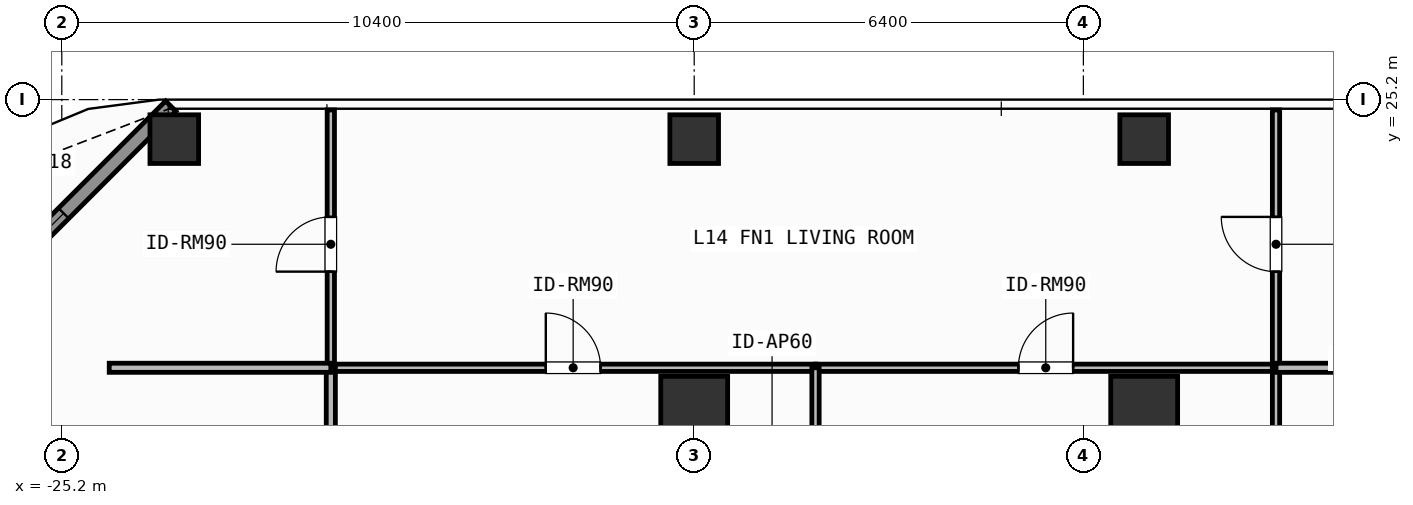
"""IFC4 building model, lengths in metres.
Left out: names, types, materials, properties, quantities, classifications, styles, units other than length and angle.
Written with IfcOpenShell. Run it as: python <this file> out.ifc"""

import sys

from ifc_helpers import new_model, si_unit, direction, frame, frame_2d, origin, origin_2d, place, context, subcontext, project, spatial, rectangle, hollow_rectangle, extrude, element, fill, save


model = new_model("IFC4")
c1 = context("Model", 3, precision=1e-05, world=origin(), true_north=direction((0.0, 1.0)))
c2 = subcontext(c1, "Body", "Model", "MODEL_VIEW")
j1 = project(units=[si_unit("LENGTHUNIT", "METRE"), si_unit("PLANEANGLEUNIT", "RADIAN")], contexts=[c1])
p1 = place(None, origin())
s1 = spatial("IfcSite", under=j1, at=p1, CompositionType="ELEMENT")
p2 = place(p1, origin())
s2 = spatial("IfcBuilding", under=s1, at=p2, CompositionType="ELEMENT")
p3 = place(p2, frame((0.0, 0.0, 54.0)))
s3 = spatial("IfcBuildingStorey", under=s2, at=p3, CompositionType="ELEMENT", Elevation=54.0)
for number, where, z_axis, x_axis in (
    (1, (-14.8, 20.1, 0.0), (0.0, 0.0, 1.0), (1.0, 0.0, 0.0)),
    (2, (-7.4, 20.1, 0.0), (0.0, 0.0, 1.0), (1.0, 0.0, 0.0)),
):
    element("IfcColumn", number, at=place(p3, frame(where, z_axis=z_axis, x_axis=x_axis)), inside=s3, PredefinedType="COLUMN", context=c2, shape_type="SweptSolid", body=[
        extrude(rectangle(XDim=1.1, YDim=1.1, at=origin_2d()), origin(), (0.0, 0.0, 1.0), 3.9),
    ])
for number, where, z_axis, x_axis in (
    (3, (-23.35, 24.55, 0.0), (0.0, 0.0, 1.0), (1.0, 0.0, 0.0)),
    (4, (-14.8, 24.55, 0.0), (0.0, 0.0, 1.0), (1.0, 0.0, 0.0)),
    (5, (-7.4, 24.55, 0.0), (0.0, 0.0, 1.0), (1.0, 0.0, 0.0)),
):
    element("IfcColumn", number, at=place(p3, frame(where, z_axis=z_axis, x_axis=x_axis)), inside=s3, PredefinedType="COLUMN", context=c2, shape_type="SweptSolid", body=[
        extrude(hollow_rectangle(XDim=0.8, YDim=0.8, WallThickness=0.036, at=origin_2d()), origin(), (0.0, 0.0, 1.0), 3.9),
    ])
p4 = place(p3, frame((-27.992, 20.508, 0.0), z_axis=(0.0, 0.0, 1.0), x_axis=(0.707106781187, 0.707106781187, 0.0)))
e6 = element("IfcWall", 6, at=p4, inside=s3, PredefinedType="SOLIDWALL", context=c2, shape_type="SweptSolid", body=[
    extrude(rectangle(XDim=6.484, YDim=0.24, at=frame_2d((3.242, 0.0))), origin(), (0.0, 0.0, 1.0), 3.68),
])
p5 = place(p4, frame((2.492, 0.0, 0.8)))
e7 = element("IfcOpeningElement", 7, at=p5, cuts=e6, PredefinedType="OPENING", context=c2, shape_type="SweptSolid", body=[
    extrude(rectangle(XDim=1.5, YDim=1.85, at=frame_2d((0.75, 0.925))), frame((0.0, 0.13, 0.0), z_axis=(0.0, -1.0, 0.0), x_axis=(1.0, 0.0, 0.0)), (0.0, 0.0, 1.0), 0.26),
])
p6 = place(p3, frame((-20.776, 20.79, 0.0), z_axis=(0.0, 0.0, 1.0), x_axis=(1.0, 0.0, 0.0)))
e8 = element("IfcWall", 8, at=p6, inside=s3, PredefinedType="PARTITIONING", context=c2, shape_type="SweptSolid", body=[
    extrude(rectangle(XDim=7.971, YDim=0.12, at=frame_2d((3.985, 0.0))), origin(), (0.0, 0.0, 1.0), 3.68),
])
p7 = place(p6, frame((3.535, 0.0, 0.0)))
e9 = element("IfcOpeningElement", 9, at=p7, cuts=e8, PredefinedType="OPENING", context=c2, shape_type="SweptSolid", body=[
    extrude(rectangle(XDim=0.9, YDim=2.1, at=frame_2d((0.45, 1.05))), frame((0.0, 0.07, 0.0), z_axis=(0.0, -1.0, 0.0), x_axis=(1.0, 0.0, 0.0)), (0.0, 0.0, 1.0), 0.14),
])
p8 = place(p3, frame((-12.805, 20.79, 0.0), z_axis=(0.0, 0.0, 1.0), x_axis=(1.0, 0.0, 0.0)))
e10 = element("IfcWall", 10, at=p8, inside=s3, PredefinedType="PARTITIONING", context=c2, shape_type="SweptSolid", body=[
    extrude(rectangle(XDim=7.573, YDim=0.12, at=frame_2d((3.787, 0.0))), origin(), (0.0, 0.0, 1.0), 3.68),
])
p9 = place(p8, frame((3.336, 0.0, 0.0)))
e11 = element("IfcOpeningElement", 11, at=p9, cuts=e10, PredefinedType="OPENING", context=c2, shape_type="SweptSolid", body=[
    extrude(rectangle(XDim=0.9, YDim=2.1, at=frame_2d((0.45, 1.05))), frame((0.0, 0.07, 0.0), z_axis=(0.0, -1.0, 0.0), x_axis=(1.0, 0.0, 0.0)), (0.0, 0.0, 1.0), 0.14),
])
p10 = place(p3, frame((-12.805, 13.7, 0.0), z_axis=(0.0, 0.0, 1.0), x_axis=(0.0, 1.0, 0.0)))
e12 = element("IfcWall", 12, at=p10, inside=s3, PredefinedType="PARTITIONING", context=c2, shape_type="SweptSolid", body=[
    extrude(rectangle(XDim=7.09, YDim=0.12, at=frame_2d((3.545, 0.0))), origin(), (0.0, 0.0, 1.0), 3.68),
])
p11 = place(p10, frame((3.006, 0.0, 0.0)))
e13 = element("IfcOpeningElement", 13, at=p11, cuts=e12, PredefinedType="OPENING", context=c2, shape_type="SweptSolid", body=[
    extrude(rectangle(XDim=0.9, YDim=2.1, at=frame_2d((0.45, 1.05))), frame((0.0, 0.07, 0.0), z_axis=(0.0, -1.0, 0.0), x_axis=(1.0, 0.0, 0.0)), (0.0, 0.0, 1.0), 0.14),
])
p12 = place(p3, frame((-20.776, 13.7, 0.0), z_axis=(0.0, 0.0, 1.0), x_axis=(0.0, 1.0, 0.0)))
e14 = element("IfcWall", 14, at=p12, inside=s3, PredefinedType="PARTITIONING", context=c2, shape_type="SweptSolid", body=[
    extrude(rectangle(XDim=7.09, YDim=0.15, at=frame_2d((3.545, 0.0))), origin(), (0.0, 0.0, 1.0), 3.68),
])
p13 = place(p12, frame((3.03, 0.0, 0.0)))
e15 = element("IfcOpeningElement", 15, at=p13, cuts=e14, PredefinedType="OPENING", context=c2, shape_type="SweptSolid", body=[
    extrude(rectangle(XDim=0.85, YDim=2.1, at=frame_2d((0.425, 1.05))), frame((0.0, 0.085, 0.0), z_axis=(0.0, -1.0, 0.0), x_axis=(1.0, 0.0, 0.0)), (0.0, 0.0, 1.0), 0.17),
])
p14 = place(p3, frame((-20.776, 20.79, 0.0), z_axis=(0.0, 0.0, 1.0), x_axis=(0.0, 1.0, 0.0)))
e16 = element("IfcWall", 16, at=p14, inside=s3, PredefinedType="PARTITIONING", context=c2, shape_type="SweptSolid", body=[
    extrude(rectangle(XDim=4.24, YDim=0.12, at=frame_2d((2.12, 0.0))), origin(), (0.0, 0.0, 1.0), 3.68),
])
p15 = place(p14, frame((1.581, 0.0, 0.0)))
e17 = element("IfcOpeningElement", 17, at=p15, cuts=e16, PredefinedType="OPENING", context=c2, shape_type="SweptSolid", body=[
    extrude(rectangle(XDim=0.9, YDim=2.1, at=frame_2d((0.45, 1.05))), frame((0.0, 0.07, 0.0), z_axis=(0.0, -1.0, 0.0), x_axis=(1.0, 0.0, 0.0)), (0.0, 0.0, 1.0), 0.14),
])
p16 = place(p3, frame((-5.232, 16.607, 0.0), z_axis=(0.0, 0.0, 1.0), x_axis=(0.0, 1.0, 0.0)))
e18 = element("IfcWall", 18, at=p16, inside=s3, PredefinedType="PARTITIONING", context=c2, shape_type="SweptSolid", body=[
    extrude(rectangle(XDim=4.183, YDim=0.12, at=frame_2d((2.092, 0.0))), origin(), (0.0, 0.0, 1.0), 3.68),
])
p17 = place(p16, frame((1.578, 0.0, 0.0)))
e19 = element("IfcOpeningElement", 19, at=p17, cuts=e18, PredefinedType="OPENING", context=c2, shape_type="SweptSolid", body=[
    extrude(rectangle(XDim=0.85, YDim=2.1, at=frame_2d((0.425, 1.05))), frame((0.0, 0.07, 0.0), z_axis=(0.0, -1.0, 0.0), x_axis=(1.0, 0.0, 0.0)), (0.0, 0.0, 1.0), 0.14),
])
p18 = place(p3, frame((-5.232, 20.79, 0.0), z_axis=(0.0, 0.0, 1.0), x_axis=(0.0, 1.0, 0.0)))
e20 = element("IfcWall", 20, at=p18, inside=s3, PredefinedType="PARTITIONING", context=c2, shape_type="SweptSolid", body=[
    extrude(rectangle(XDim=4.24, YDim=0.12, at=frame_2d((2.12, 0.0))), origin(), (0.0, 0.0, 1.0), 3.68),
])
p19 = place(p18, frame((1.581, 0.0, 0.0)))
e21 = element("IfcOpeningElement", 21, at=p19, cuts=e20, PredefinedType="OPENING", context=c2, shape_type="SweptSolid", body=[
    extrude(rectangle(XDim=0.9, YDim=2.1, at=frame_2d((0.45, 1.05))), frame((0.0, 0.07, 0.0), z_axis=(0.0, -1.0, 0.0), x_axis=(1.0, 0.0, 0.0)), (0.0, 0.0, 1.0), 0.14),
])
p20 = place(p3, frame((-24.42, 20.79, 0.0), z_axis=(0.0, 0.0, 1.0), x_axis=(1.0, 0.0, 0.0)))
e22 = element("IfcWall", 22, at=p20, inside=s3, PredefinedType="PARTITIONING", context=c2, shape_type="SweptSolid", body=[
    extrude(rectangle(XDim=3.644, YDim=0.15, at=frame_2d((1.822, 0.0))), origin(), (0.0, 0.0, 1.0), 3.68),
])
p21 = place(p3, frame((-5.232, 20.79, 0.0), z_axis=(0.0, 0.0, 1.0), x_axis=(1.0, 0.0, 0.0)))
e23 = element("IfcWall", 23, at=p21, inside=s3, PredefinedType="PARTITIONING", context=c2, shape_type="SweptSolid", body=[
    extrude(rectangle(XDim=6.206, YDim=0.15, at=frame_2d((3.103, 0.0))), origin(), (0.0, 0.0, 1.0), 3.68),
])
p22 = place(p5, origin())
e24 = element("IfcWindow", 24, at=p22, inside=s3, PartitioningType="SINGLE_PANEL", PredefinedType="WINDOW", context=c2, shape_type="SweptSolid", body=[
    extrude(rectangle(XDim=1.5, YDim=1.85, at=frame_2d((0.75, 0.925))), frame((0.0, 0.03, 0.0), z_axis=(0.0, -1.0, 0.0), x_axis=(1.0, 0.0, 0.0)), (0.0, 0.0, 1.0), 0.06),
])
fill(e7, e24)
p23 = place(p7, origin())
e25 = element("IfcDoor", 25, at=p23, inside=s3, OperationType="SINGLE_SWING_LEFT", PredefinedType="DOOR", context=c2, shape_type="SweptSolid", body=[
    extrude(rectangle(XDim=0.9, YDim=2.1, at=frame_2d((0.45, 1.05))), frame((0.0, 0.025, 0.0), z_axis=(0.0, -1.0, 0.0), x_axis=(1.0, 0.0, 0.0)), (0.0, 0.0, 1.0), 0.05),
])
fill(e9, e25)
p24 = place(p9, origin())
e26 = element("IfcDoor", 26, at=p24, inside=s3, OperationType="SINGLE_SWING_RIGHT", PredefinedType="DOOR", context=c2, shape_type="SweptSolid", body=[
    extrude(rectangle(XDim=0.9, YDim=2.1, at=frame_2d((0.45, 1.05))), frame((0.0, 0.025, 0.0), z_axis=(0.0, -1.0, 0.0), x_axis=(1.0, 0.0, 0.0)), (0.0, 0.0, 1.0), 0.05),
])
fill(e11, e26)
p25 = place(p15, origin())
e27 = element("IfcDoor", 27, at=p25, inside=s3, OperationType="SINGLE_SWING_LEFT", PredefinedType="DOOR", context=c2, shape_type="SweptSolid", body=[
    extrude(rectangle(XDim=0.9, YDim=2.1, at=frame_2d((0.45, 1.05))), frame((0.0, 0.025, 0.0), z_axis=(0.0, -1.0, 0.0), x_axis=(1.0, 0.0, 0.0)), (0.0, 0.0, 1.0), 0.05),
])
fill(e17, e27)
p26 = place(p19, origin())
e28 = element("IfcDoor", 28, at=p26, inside=s3, OperationType="SINGLE_SWING_RIGHT", PredefinedType="DOOR", context=c2, shape_type="SweptSolid", body=[
    extrude(rectangle(XDim=0.9, YDim=2.1, at=frame_2d((0.45, 1.05))), frame((0.0, 0.025, 0.0), z_axis=(0.0, -1.0, 0.0), x_axis=(1.0, 0.0, 0.0)), (0.0, 0.0, 1.0), 0.05),
])
fill(e21, e28)
save(model, sys.argv[1])
